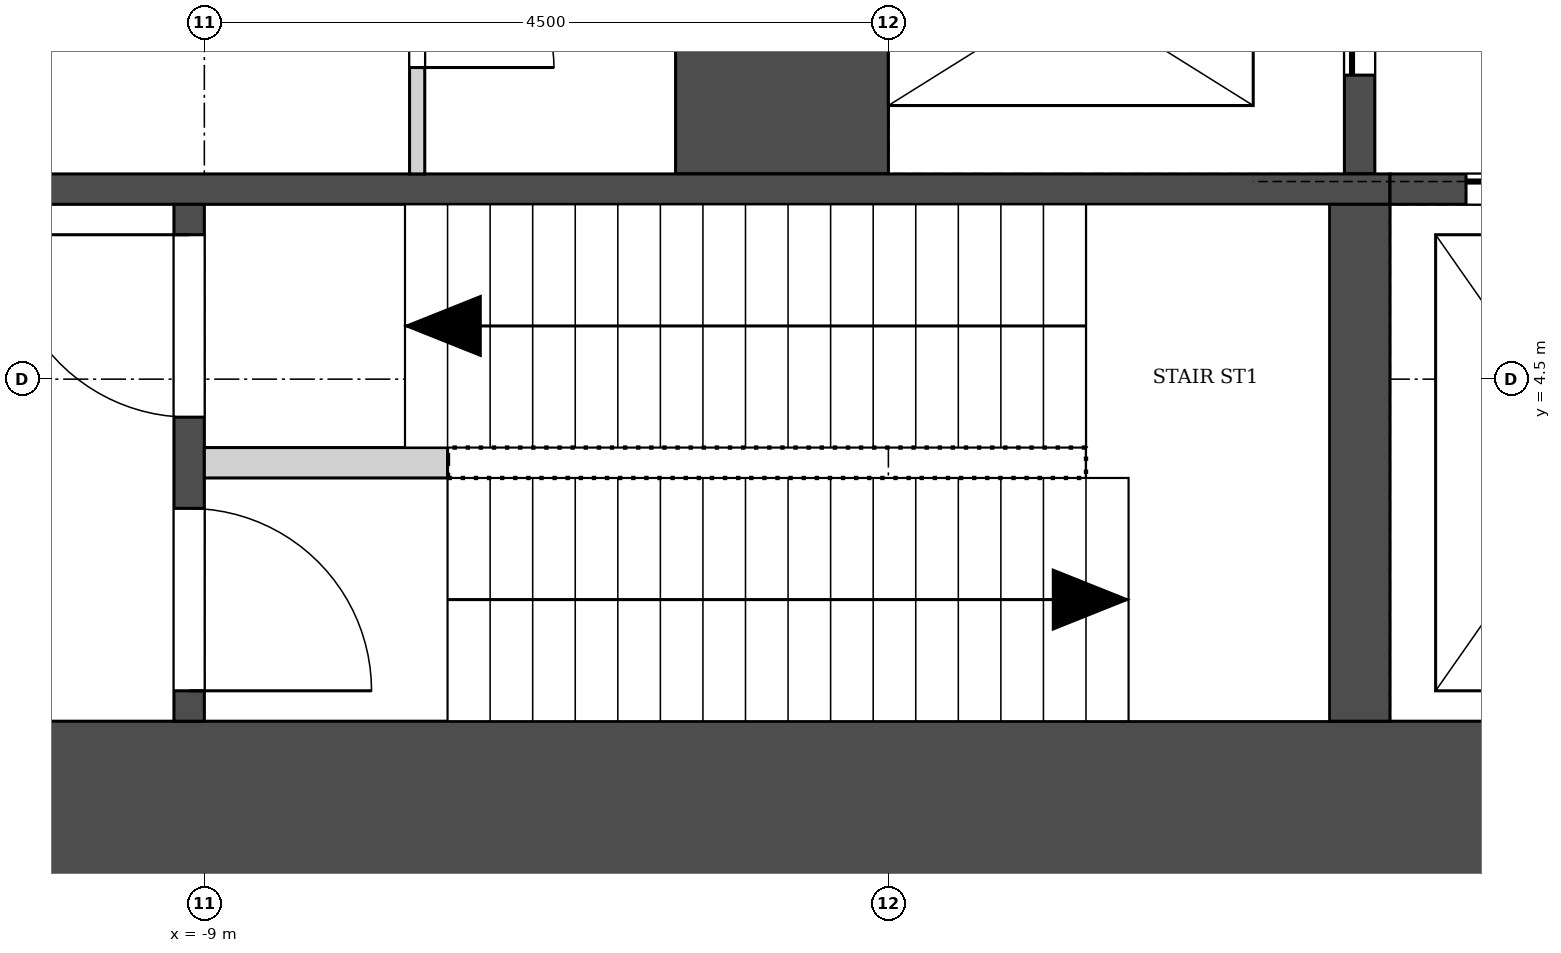
"""IFC4 building model, lengths in metres.
Left out: names, types, materials, properties, quantities, classifications, styles, units other than length and angle.
Written with IfcOpenShell. Run it as: python <this file> out.ifc"""

import sys

from ifc_helpers import new_model, si_unit, direction, frame, frame_2d, origin, place, context, subcontext, project, spatial, rectangle, extrude, element, fill, save


model = new_model("IFC4")
c1 = context("Model", 3, precision=1e-05, world=origin(), true_north=direction((0.0, 1.0)))
c2 = subcontext(c1, "Body", "Model", "MODEL_VIEW")
j1 = project(units=[si_unit("LENGTHUNIT", "METRE"), si_unit("PLANEANGLEUNIT", "RADIAN")], contexts=[c1])
p1 = place(None, origin())
s1 = spatial("IfcSite", under=j1, at=p1, CompositionType="ELEMENT")
p2 = place(p1, origin())
s2 = spatial("IfcBuilding", under=s1, at=p2, CompositionType="ELEMENT")
p3 = place(p2, frame((0.0, 0.0, 47.5)))
s3 = spatial("IfcBuildingStorey", under=s2, at=p3, CompositionType="ELEMENT", Elevation=47.5)
p4 = place(p3, frame((-14.0, 1.55, 0.0), z_axis=(0.0, 0.0, 1.0), x_axis=(1.0, 0.0, 0.0)))
e1 = element("IfcWall", 1, at=p4, inside=s3, PredefinedType="SHEAR", context=c2, shape_type="SweptSolid", body=[
    extrude(rectangle(XDim=28.0, YDim=1.4, at=frame_2d((14.0, 0.0))), origin(), (0.0, 0.0, 1.0), 5.4),
])
p5 = place(p3, frame((-1.4, 5.85, -0.3), z_axis=(0.0, 0.0, 1.0), x_axis=(0.0, 1.0, 0.0)))
e2 = element("IfcWall", 2, at=p5, inside=s3, PredefinedType="SOLIDWALL", context=c2, shape_type="SweptSolid", body=[
    extrude(rectangle(XDim=11.75, YDim=0.2, at=frame_2d((5.875, 0.0))), origin(), (0.0, 0.0, 1.0), 5.4),
])
p6 = place(p5, frame((3.2, 0.0, 0.3)))
e3 = element("IfcOpeningElement", 3, at=p6, cuts=e2, PredefinedType="OPENING", context=c2, shape_type="SweptSolid", body=[
    extrude(rectangle(XDim=1.2, YDim=2.1, at=frame_2d((0.6, 1.05))), frame((0.0, 0.11, 0.0), z_axis=(0.0, -1.0, 0.0), x_axis=(1.0, 0.0, 0.0)), (0.0, 0.0, 1.0), 0.22),
])
p7 = place(p5, frame((0.65, 0.0, 0.3)))
e4 = element("IfcOpeningElement", 4, at=p7, cuts=e2, PredefinedType="OPENING", context=c2, shape_type="SweptSolid", body=[
    extrude(rectangle(XDim=1.1, YDim=2.1, at=frame_2d((0.55, 1.05))), frame((0.0, 0.11, 0.0), z_axis=(0.0, -1.0, 0.0), x_axis=(1.0, 0.0, 0.0)), (0.0, 0.0, 1.0), 0.22),
])
p8 = place(p3, frame((-5.2, 5.85, -0.3), z_axis=(0.0, 0.0, 1.0), x_axis=(0.0, 1.0, 0.0)))
e5 = element("IfcWall", 5, at=p8, inside=s3, PredefinedType="SOLIDWALL", context=c2, shape_type="SweptSolid", body=[
    extrude(rectangle(XDim=2.4, YDim=1.4, at=frame_2d((1.2, 0.0))), origin(), (0.0, 0.0, 1.0), 5.4),
])
p9 = place(p3, frame((-12.6, 5.75, -0.3), z_axis=(0.0, 0.0, 1.0), x_axis=(1.0, 0.0, 0.0)))
e6 = element("IfcWall", 6, at=p9, inside=s3, PredefinedType="SOLIDWALL", context=c2, shape_type="SweptSolid", body=[
    extrude(rectangle(XDim=11.4, YDim=0.2, at=frame_2d((5.7, 0.0))), origin(), (0.0, 0.0, 1.0), 5.4),
])
p10 = place(p3, frame((-1.2, 5.75, -0.3), z_axis=(0.0, 0.0, 1.0), x_axis=(1.0, 0.0, 0.0)))
e7 = element("IfcWall", 7, at=p10, inside=s3, PredefinedType="SOLIDWALL", context=c2, shape_type="SweptSolid", body=[
    extrude(rectangle(XDim=2.4, YDim=0.2, at=frame_2d((1.2, 0.0))), origin(), (0.0, 0.0, 1.0), 5.4),
])
p11 = place(p10, frame((0.5, 0.0, 0.3)))
e8 = element("IfcOpeningElement", 8, at=p11, cuts=e7, PredefinedType="OPENING", context=c2, shape_type="SweptSolid", body=[
    extrude(rectangle(XDim=1.4, YDim=2.1, at=frame_2d((0.7, 1.05))), frame((0.0, 0.11, 0.0), z_axis=(0.0, -1.0, 0.0), x_axis=(1.0, 0.0, 0.0)), (0.0, 0.0, 1.0), 0.22),
])
p12 = place(p3, frame((-9.1, 2.25, -0.3), z_axis=(0.0, 0.0, 1.0), x_axis=(0.0, 1.0, 0.0)))
e9 = element("IfcWall", 9, at=p12, inside=s3, PredefinedType="SOLIDWALL", context=c2, shape_type="SweptSolid", body=[
    extrude(rectangle(XDim=3.4, YDim=0.2, at=frame_2d((1.7, 0.0))), origin(), (0.0, 0.0, 1.0), 5.4),
])
p13 = place(p12, frame((0.2, 0.0, 0.3)))
e10 = element("IfcOpeningElement", 10, at=p13, cuts=e9, PredefinedType="OPENING", context=c2, shape_type="SweptSolid", body=[
    extrude(rectangle(XDim=1.2, YDim=2.1, at=frame_2d((0.6, 1.05))), frame((0.0, 0.11, 0.0), z_axis=(0.0, -1.0, 0.0), x_axis=(1.0, 0.0, 0.0)), (0.0, 0.0, 1.0), 0.22),
])
p14 = place(p12, frame((2.0, 0.0, 0.3)))
e11 = element("IfcOpeningElement", 11, at=p14, cuts=e9, PredefinedType="OPENING", context=c2, shape_type="SweptSolid", body=[
    extrude(rectangle(XDim=1.2, YDim=2.1, at=frame_2d((0.6, 1.05))), frame((0.0, 0.11, 0.0), z_axis=(0.0, -1.0, 0.0), x_axis=(1.0, 0.0, 0.0)), (0.0, 0.0, 1.0), 0.22),
])
p15 = place(p3, frame((-1.4, 2.25, -0.3), z_axis=(0.0, 0.0, 1.0), x_axis=(0.0, 1.0, 0.0)))
e12 = element("IfcWall", 12, at=p15, inside=s3, PredefinedType="SOLIDWALL", context=c2, shape_type="SweptSolid", body=[
    extrude(rectangle(XDim=3.4, YDim=0.4, at=frame_2d((1.7, 0.0))), origin(), (0.0, 0.0, 1.0), 5.4),
])
p16 = place(p3, frame((-7.6, 5.85, 0.0), z_axis=(0.0, 0.0, 1.0), x_axis=(0.0, 1.0, 0.0)))
e13 = element("IfcWall", 13, at=p16, inside=s3, PredefinedType="PARTITIONING", context=c2, shape_type="SweptSolid", body=[
    extrude(rectangle(XDim=2.4, YDim=0.1, at=frame_2d((1.2, 0.0))), origin(), (0.0, 0.0, 1.0), 5.1),
])
p17 = place(p16, frame((0.7, 0.0, 0.0)))
e14 = element("IfcOpeningElement", 14, at=p17, cuts=e13, PredefinedType="OPENING", context=c2, shape_type="SweptSolid", body=[
    extrude(rectangle(XDim=0.9, YDim=2.1, at=frame_2d((0.45, 1.05))), frame((0.0, 0.06, 0.0), z_axis=(0.0, -1.0, 0.0), x_axis=(1.0, 0.0, 0.0)), (0.0, 0.0, 1.0), 0.12),
])
p18 = place(p3, frame((-9.0, 3.95, 0.0), z_axis=(0.0, 0.0, 1.0), x_axis=(1.0, 0.0, 0.0)))
e15 = element("IfcWall", 15, at=p18, inside=s3, PredefinedType="SOLIDWALL", context=c2, shape_type="SweptSolid", body=[
    extrude(rectangle(XDim=1.6, YDim=0.2, at=frame_2d((0.8, 0.0))), origin(), (0.0, 0.0, 1.0), 5.1),
])
p19 = place(p7, origin())
e16 = element("IfcDoor", 16, at=p19, inside=s3, OperationType="SLIDING_TO_RIGHT", PredefinedType="DOOR", context=c2, shape_type="SweptSolid", body=[
    extrude(rectangle(XDim=1.1, YDim=2.1, at=frame_2d((0.55, 1.05))), frame((0.0, 0.025, 0.0), z_axis=(0.0, -1.0, 0.0), x_axis=(1.0, 0.0, 0.0)), (0.0, 0.0, 1.0), 0.05),
])
fill(e4, e16)
p20 = place(p11, origin())
e17 = element("IfcDoor", 17, at=p20, inside=s3, OperationType="SLIDING_TO_LEFT", PredefinedType="DOOR", context=c2, shape_type="SweptSolid", body=[
    extrude(rectangle(XDim=1.4, YDim=2.1, at=frame_2d((0.7, 1.05))), frame((0.0, 0.025, 0.0), z_axis=(0.0, -1.0, 0.0), x_axis=(1.0, 0.0, 0.0)), (0.0, 0.0, 1.0), 0.05),
])
fill(e8, e17)
p21 = place(p17, frame((0.9, 0.0, 0.0), z_axis=(0.0, 0.0, 1.0), x_axis=(-1.0, 0.0, 0.0)))
e18 = element("IfcDoor", 18, at=p21, inside=s3, OperationType="SINGLE_SWING_RIGHT", PredefinedType="DOOR", context=c2, shape_type="SweptSolid", body=[
    extrude(rectangle(XDim=0.9, YDim=2.1, at=frame_2d((0.45, 1.05))), frame((0.0, 0.025, 0.0), z_axis=(0.0, -1.0, 0.0), x_axis=(1.0, 0.0, 0.0)), (0.0, 0.0, 1.0), 0.05),
])
fill(e14, e18)
p22 = place(p13, frame((1.2, 0.0, 0.0), z_axis=(0.0, 0.0, 1.0), x_axis=(-1.0, 0.0, 0.0)))
e19 = element("IfcDoor", 19, at=p22, inside=s3, OperationType="SINGLE_SWING_RIGHT", PredefinedType="DOOR", context=c2, shape_type="SweptSolid", body=[
    extrude(rectangle(XDim=1.2, YDim=2.1, at=frame_2d((0.6, 1.05))), frame((0.0, 0.025, 0.0), z_axis=(0.0, -1.0, 0.0), x_axis=(1.0, 0.0, 0.0)), (0.0, 0.0, 1.0), 0.05),
])
fill(e10, e19)
p23 = place(p14, origin())
e20 = element("IfcDoor", 20, at=p23, inside=s3, OperationType="SINGLE_SWING_RIGHT", PredefinedType="DOOR", context=c2, shape_type="SweptSolid", body=[
    extrude(rectangle(XDim=1.2, YDim=2.1, at=frame_2d((0.6, 1.05))), frame((0.0, 0.025, 0.0), z_axis=(0.0, -1.0, 0.0), x_axis=(1.0, 0.0, 0.0)), (0.0, 0.0, 1.0), 0.05),
])
fill(e11, e20)
save(model, sys.argv[1])
